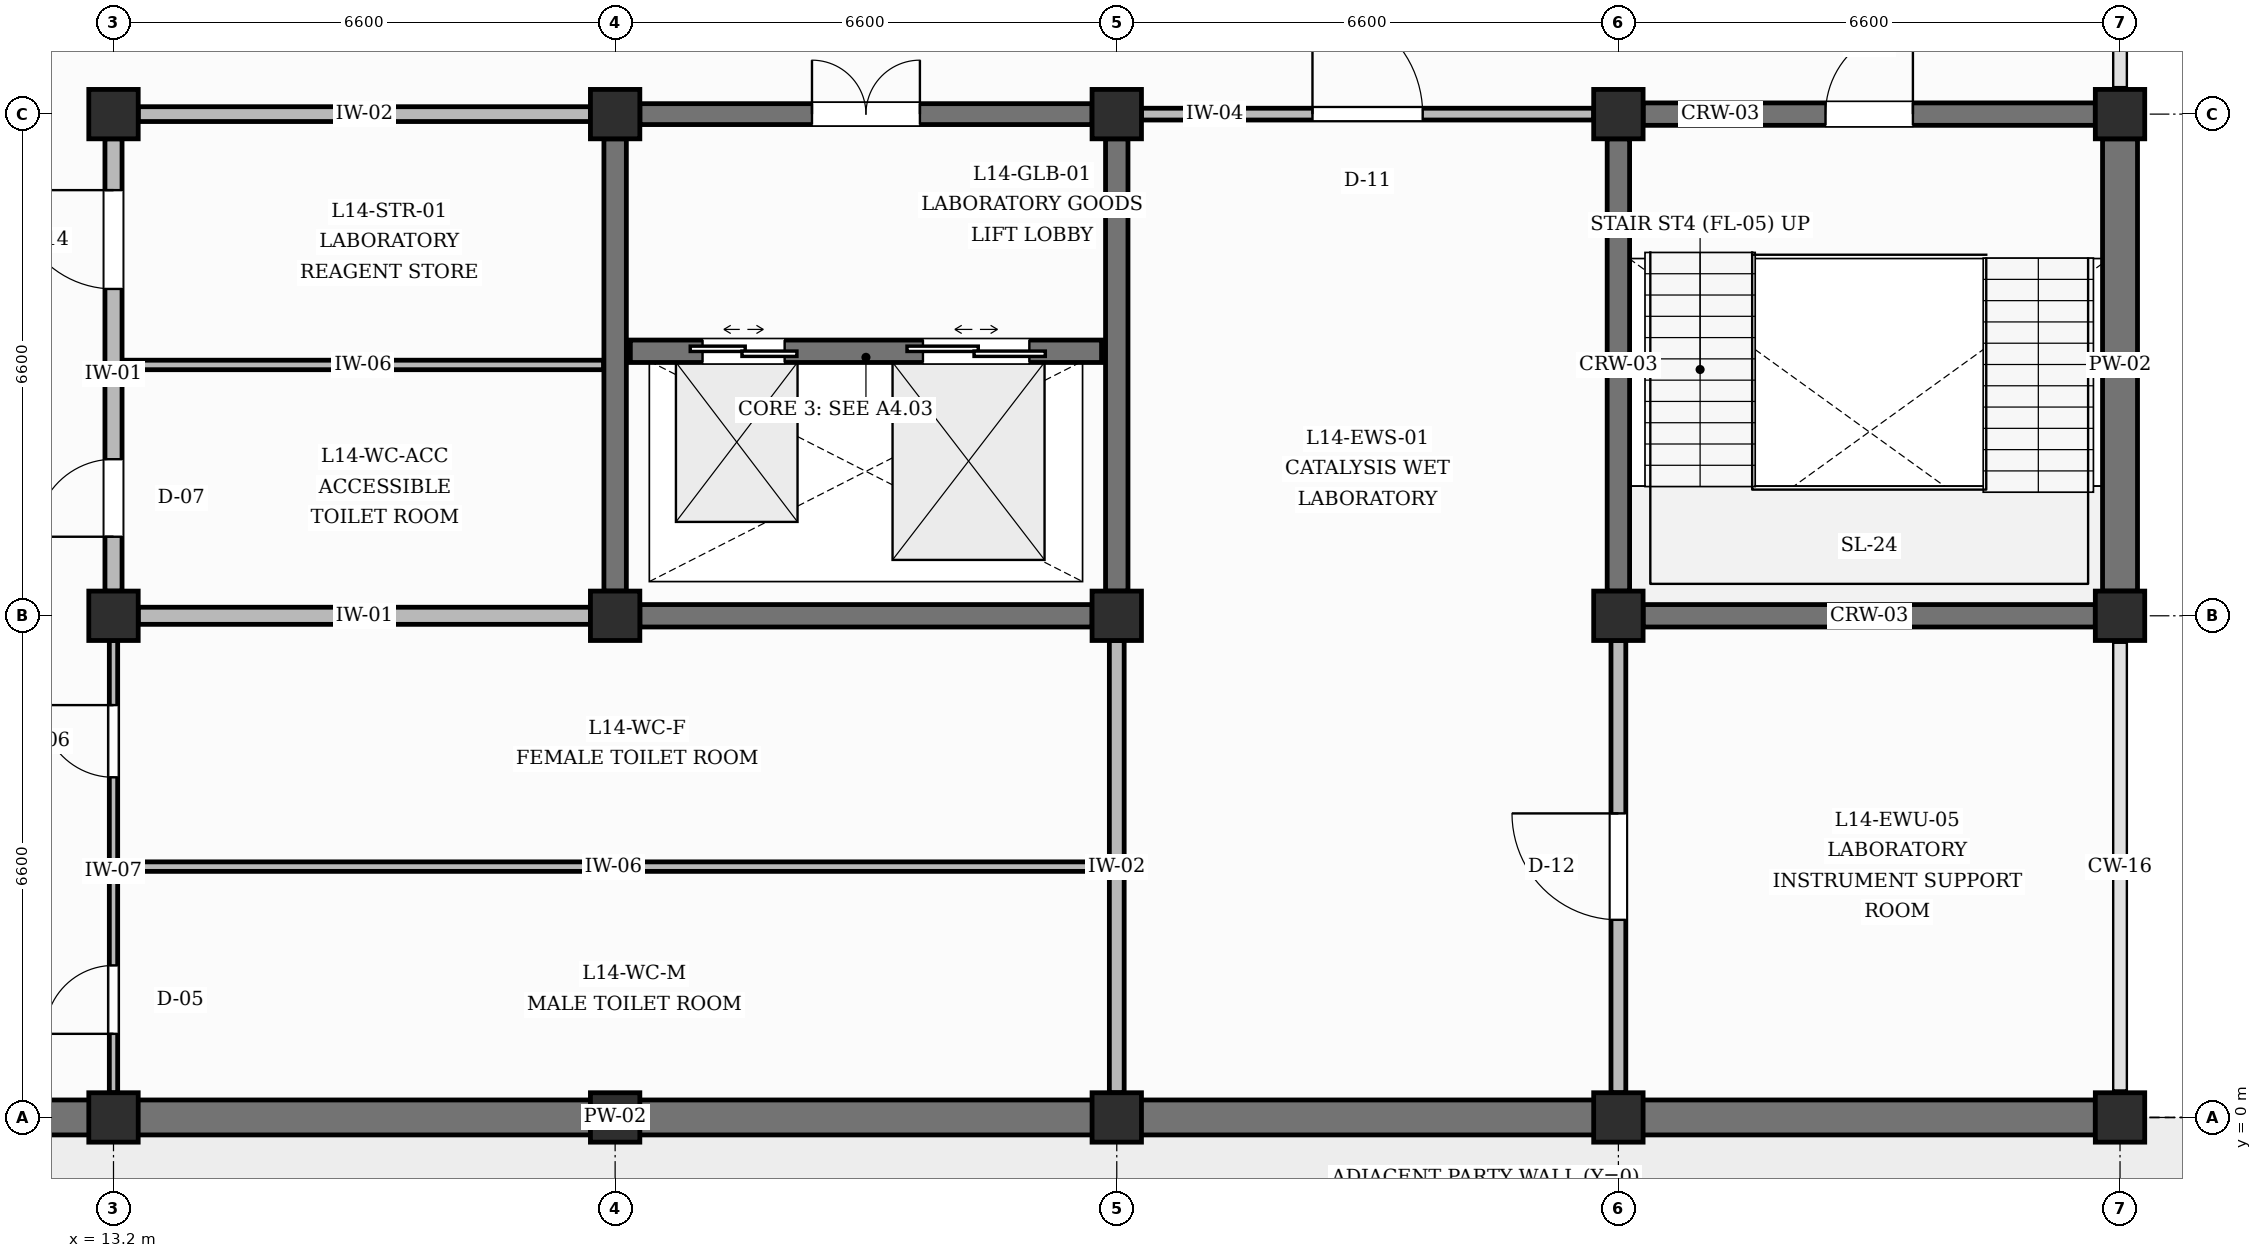
"""IFC4 building model, lengths in metres.
Left out: names, types, materials, properties, quantities, classifications, styles, units other than length and angle.
Written with IfcOpenShell. Run it as: python <this file> out.ifc"""

import sys

from ifc_helpers import new_model, si_unit, direction, frame, frame_2d, origin, origin_2d, place, context, subcontext, project, spatial, rectangle, extrude, element, fill, save


model = new_model("IFC4")
c1 = context("Model", 3, precision=1e-05, world=origin(), true_north=direction((0.0, 1.0)))
c2 = subcontext(c1, "Body", "Model", "MODEL_VIEW")
j1 = project(units=[si_unit("LENGTHUNIT", "METRE"), si_unit("PLANEANGLEUNIT", "RADIAN")], contexts=[c1])
p1 = place(None, origin())
s1 = spatial("IfcSite", under=j1, at=p1, CompositionType="ELEMENT")
p2 = place(p1, origin())
s2 = spatial("IfcBuilding", under=s1, at=p2, CompositionType="ELEMENT")
p3 = place(p2, frame((0.0, 0.0, 60.6)))
s3 = spatial("IfcBuildingStorey", under=s2, at=p3, CompositionType="ELEMENT", Elevation=60.6)
for number, where, z_axis, x_axis in (
    (1, (13.2, 0.0, 0.0), (0.0, 0.0, 1.0), (1.0, 0.0, 0.0)),
    (2, (13.2, 6.6, 0.0), (0.0, 0.0, 1.0), (1.0, 0.0, 0.0)),
    (3, (13.2, 13.2, 0.0), (0.0, 0.0, 1.0), (1.0, 0.0, 0.0)),
    (4, (19.8, 0.0, 0.0), (0.0, 0.0, 1.0), (1.0, 0.0, 0.0)),
    (5, (19.8, 6.6, 0.0), (0.0, 0.0, 1.0), (1.0, 0.0, 0.0)),
    (6, (19.8, 13.2, 0.0), (0.0, 0.0, 1.0), (1.0, 0.0, 0.0)),
    (7, (26.4, 0.0, 0.0), (0.0, 0.0, 1.0), (1.0, 0.0, 0.0)),
    (8, (26.4, 6.6, 0.0), (0.0, 0.0, 1.0), (1.0, 0.0, 0.0)),
    (9, (26.4, 13.2, 0.0), (0.0, 0.0, 1.0), (1.0, 0.0, 0.0)),
    (10, (33.0, 0.0, 0.0), (0.0, 0.0, 1.0), (1.0, 0.0, 0.0)),
    (11, (33.0, 6.6, 0.0), (0.0, 0.0, 1.0), (1.0, 0.0, 0.0)),
    (12, (33.0, 13.2, 0.0), (0.0, 0.0, 1.0), (1.0, 0.0, 0.0)),
    (13, (39.6, 0.0, 0.0), (0.0, 0.0, 1.0), (1.0, 0.0, 0.0)),
    (14, (39.6, 6.6, 0.0), (0.0, 0.0, 1.0), (1.0, 0.0, 0.0)),
    (15, (39.6, 13.2, 0.0), (0.0, 0.0, 1.0), (1.0, 0.0, 0.0)),
):
    element("IfcColumn", number, at=place(p3, frame(where, z_axis=z_axis, x_axis=x_axis)), inside=s3, PredefinedType="COLUMN", context=c2, shape_type="SweptSolid", body=[
        extrude(rectangle(XDim=0.65, YDim=0.65, at=origin_2d()), origin(), (0.0, 0.0, 1.0), 4.2),
    ])
p4 = place(p3, frame((6.925, 0.0, 0.0), z_axis=(0.0, 0.0, 1.0), x_axis=(1.0, 0.0, 0.0)))
e16 = element("IfcWall", 16, at=p4, inside=s3, PredefinedType="SOLIDWALL", context=c2, shape_type="SweptSolid", body=[
    extrude(rectangle(XDim=5.95, YDim=0.46, at=frame_2d((2.975, 0.0))), origin(), (0.0, 0.0, 1.0), 3.31),
])
p5 = place(p3, frame((13.525, 0.0, 0.0), z_axis=(0.0, 0.0, 1.0), x_axis=(1.0, 0.0, 0.0)))
e17 = element("IfcWall", 17, at=p5, inside=s3, PredefinedType="SOLIDWALL", context=c2, shape_type="SweptSolid", body=[
    extrude(rectangle(XDim=5.95, YDim=0.46, at=frame_2d((2.975, 0.0))), origin(), (0.0, 0.0, 1.0), 3.31),
])
for number, where, z_axis, x_axis in (
    (18, (20.125, 0.0, 0.0), (0.0, 0.0, 1.0), (1.0, 0.0, 0.0)),
    (19, (26.725, 0.0, 0.0), (0.0, 0.0, 1.0), (1.0, 0.0, 0.0)),
    (20, (33.325, 0.0, 0.0), (0.0, 0.0, 1.0), (1.0, 0.0, 0.0)),
    (21, (39.6, 6.925, 0.0), (0.0, 0.0, 1.0), (0.0, 1.0, 0.0)),
):
    element("IfcWall", number, at=place(p3, frame(where, z_axis=z_axis, x_axis=x_axis)), inside=s3, PredefinedType="SOLIDWALL", context=c2, shape_type="SweptSolid", body=[
        extrude(rectangle(XDim=5.95, YDim=0.46, at=frame_2d((2.975, 0.0))), origin(), (0.0, 0.0, 1.0), 3.31),
    ])
p6 = place(p3, frame((33.325, 6.6, 0.0), z_axis=(0.0, 0.0, 1.0), x_axis=(1.0, 0.0, 0.0)))
e22 = element("IfcWall", 22, at=p6, inside=s3, PredefinedType="SHEAR", context=c2, shape_type="SweptSolid", body=[
    extrude(rectangle(XDim=5.95, YDim=0.295, at=frame_2d((2.975, 0.0))), origin(), (0.0, 0.0, 1.0), 3.31),
])
p7 = place(p3, frame((33.325, 13.2, 0.0), z_axis=(0.0, 0.0, 1.0), x_axis=(1.0, 0.0, 0.0)))
e23 = element("IfcWall", 23, at=p7, inside=s3, PredefinedType="SHEAR", context=c2, shape_type="SweptSolid", body=[
    extrude(rectangle(XDim=5.95, YDim=0.295, at=frame_2d((2.975, 0.0))), origin(), (0.0, 0.0, 1.0), 3.31),
])
p8 = place(p7, frame((2.4, 0.0, 0.0)))
e24 = element("IfcOpeningElement", 24, at=p8, cuts=e23, PredefinedType="OPENING", context=c2, shape_type="SweptSolid", body=[
    extrude(rectangle(XDim=1.15, YDim=2.2, at=frame_2d((0.575, 1.1))), frame((0.0, 0.157, 0.0), z_axis=(0.0, -1.0, 0.0), x_axis=(1.0, 0.0, 0.0)), (0.0, 0.0, 1.0), 0.315),
])
for number, where, z_axis, x_axis in (
    (25, (33.0, 6.925, 0.0), (0.0, 0.0, 1.0), (0.0, 1.0, 0.0)),
    (26, (20.125, 6.6, 0.0), (0.0, 0.0, 1.0), (1.0, 0.0, 0.0)),
    (27, (19.8, 6.925, 0.0), (0.0, 0.0, 1.0), (0.0, 1.0, 0.0)),
    (28, (26.4, 6.925, 0.0), (0.0, 0.0, 1.0), (0.0, 1.0, 0.0)),
):
    element("IfcWall", number, at=place(p3, frame(where, z_axis=z_axis, x_axis=x_axis)), inside=s3, PredefinedType="SHEAR", context=c2, shape_type="SweptSolid", body=[
        extrude(rectangle(XDim=5.95, YDim=0.295, at=frame_2d((2.975, 0.0))), origin(), (0.0, 0.0, 1.0), 3.31),
    ])
p9 = place(p3, frame((20.125, 13.2, 0.0), z_axis=(0.0, 0.0, 1.0), x_axis=(1.0, 0.0, 0.0)))
e29 = element("IfcWall", 29, at=p9, inside=s3, PredefinedType="SHEAR", context=c2, shape_type="SweptSolid", body=[
    extrude(rectangle(XDim=5.95, YDim=0.275, at=frame_2d((2.975, 0.0))), origin(), (0.0, 0.0, 1.0), 3.31),
])
p10 = place(p9, frame((2.265, 0.0, 0.0)))
e30 = element("IfcOpeningElement", 30, at=p10, cuts=e29, PredefinedType="OPENING", context=c2, shape_type="SweptSolid", body=[
    extrude(rectangle(XDim=1.42, YDim=2.2, at=frame_2d((0.71, 1.1))), frame((0.0, 0.147, 0.0), z_axis=(0.0, -1.0, 0.0), x_axis=(1.0, 0.0, 0.0)), (0.0, 0.0, 1.0), 0.295),
])
p11 = place(p3, frame((20.0, 10.08, 0.0), z_axis=(0.0, 0.0, 1.0), x_axis=(1.0, 0.0, 0.0)))
e31 = element("IfcWall", 31, at=p11, inside=s3, PredefinedType="SHEAR", context=c2, shape_type="SweptSolid", body=[
    extrude(rectangle(XDim=6.2, YDim=0.295, at=frame_2d((3.1, 0.0))), origin(), (0.0, 0.0, 1.0), 3.91),
])
p12 = place(p11, frame((0.95, 0.0, 0.0)))
e32 = element("IfcOpeningElement", 32, at=p12, cuts=e31, PredefinedType="OPENING", context=c2, shape_type="SweptSolid", body=[
    extrude(rectangle(XDim=1.08, YDim=2.15, at=frame_2d((0.54, 1.075))), frame((0.0, 0.157, 0.0), z_axis=(0.0, -1.0, 0.0), x_axis=(1.0, 0.0, 0.0)), (0.0, 0.0, 1.0), 0.315),
])
p13 = place(p11, frame((3.85, 0.0, 0.0)))
e33 = element("IfcOpeningElement", 33, at=p13, cuts=e31, PredefinedType="OPENING", context=c2, shape_type="SweptSolid", body=[
    extrude(rectangle(XDim=1.4, YDim=2.35, at=frame_2d((0.7, 1.175))), frame((0.0, 0.157, 0.0), z_axis=(0.0, -1.0, 0.0), x_axis=(1.0, 0.0, 0.0)), (0.0, 0.0, 1.0), 0.315),
])
p14 = place(p3, frame((13.2, 0.325, 0.0), z_axis=(0.0, 0.0, 1.0), x_axis=(0.0, 1.0, 0.0)))
e34 = element("IfcWall", 34, at=p14, inside=s3, PredefinedType="PARTITIONING", context=c2, shape_type="SweptSolid", body=[
    extrude(rectangle(XDim=5.95, YDim=0.11, at=frame_2d((2.975, 0.0))), origin(), (0.0, 0.0, 1.0), 3.31),
])
p15 = place(p14, frame((0.775, 0.0, 0.0)))
e35 = element("IfcOpeningElement", 35, at=p15, cuts=e34, PredefinedType="OPENING", context=c2, shape_type="SweptSolid", body=[
    extrude(rectangle(XDim=0.9, YDim=2.1, at=frame_2d((0.45, 1.05))), frame((0.0, 0.065, 0.0), z_axis=(0.0, -1.0, 0.0), x_axis=(1.0, 0.0, 0.0)), (0.0, 0.0, 1.0), 0.13),
])
p16 = place(p14, frame((4.15, 0.0, 0.0)))
e36 = element("IfcOpeningElement", 36, at=p16, cuts=e34, PredefinedType="OPENING", context=c2, shape_type="SweptSolid", body=[
    extrude(rectangle(XDim=0.95, YDim=2.1, at=frame_2d((0.475, 1.05))), frame((0.0, 0.065, 0.0), z_axis=(0.0, -1.0, 0.0), x_axis=(1.0, 0.0, 0.0)), (0.0, 0.0, 1.0), 0.13),
])
p17 = place(p3, frame((26.4, 0.325, 0.0), z_axis=(0.0, 0.0, 1.0), x_axis=(0.0, 1.0, 0.0)))
e37 = element("IfcWall", 37, at=p17, inside=s3, PredefinedType="PARTITIONING", context=c2, shape_type="SweptSolid", body=[
    extrude(rectangle(XDim=5.95, YDim=0.195, at=frame_2d((2.975, 0.0))), origin(), (0.0, 0.0, 1.0), 3.31),
])
p18 = place(p3, frame((13.525, 6.6, 0.0), z_axis=(0.0, 0.0, 1.0), x_axis=(1.0, 0.0, 0.0)))
e38 = element("IfcWall", 38, at=p18, inside=s3, PredefinedType="PARTITIONING", context=c2, shape_type="SweptSolid", body=[
    extrude(rectangle(XDim=5.95, YDim=0.225, at=frame_2d((2.975, 0.0))), origin(), (0.0, 0.0, 1.0), 3.31),
])
p19 = place(p3, frame((13.2, 6.925, 0.0), z_axis=(0.0, 0.0, 1.0), x_axis=(0.0, 1.0, 0.0)))
e39 = element("IfcWall", 39, at=p19, inside=s3, PredefinedType="PARTITIONING", context=c2, shape_type="SweptSolid", body=[
    extrude(rectangle(XDim=5.95, YDim=0.225, at=frame_2d((2.975, 0.0))), origin(), (0.0, 0.0, 1.0), 3.31),
])
p20 = place(p19, frame((0.715, 0.0, 0.0)))
e40 = element("IfcOpeningElement", 40, at=p20, cuts=e39, PredefinedType="OPENING", context=c2, shape_type="SweptSolid", body=[
    extrude(rectangle(XDim=1.02, YDim=2.15, at=frame_2d((0.51, 1.075))), frame((0.0, 0.123, 0.0), z_axis=(0.0, -1.0, 0.0), x_axis=(1.0, 0.0, 0.0)), (0.0, 0.0, 1.0), 0.245),
])
p21 = place(p19, frame((3.975, 0.0, 0.0)))
e41 = element("IfcOpeningElement", 41, at=p21, cuts=e39, PredefinedType="OPENING", context=c2, shape_type="SweptSolid", body=[
    extrude(rectangle(XDim=1.3, YDim=2.3, at=frame_2d((0.65, 1.15))), frame((0.0, 0.123, 0.0), z_axis=(0.0, -1.0, 0.0), x_axis=(1.0, 0.0, 0.0)), (0.0, 0.0, 1.0), 0.245),
])
p22 = place(p3, frame((13.525, 13.2, 0.0), z_axis=(0.0, 0.0, 1.0), x_axis=(1.0, 0.0, 0.0)))
e42 = element("IfcWall", 42, at=p22, inside=s3, PredefinedType="PARTITIONING", context=c2, shape_type="SweptSolid", body=[
    extrude(rectangle(XDim=5.95, YDim=0.195, at=frame_2d((2.975, 0.0))), origin(), (0.0, 0.0, 1.0), 3.31),
])
p23 = place(p3, frame((33.0, 0.325, 0.0), z_axis=(0.0, 0.0, 1.0), x_axis=(0.0, 1.0, 0.0)))
e43 = element("IfcWall", 43, at=p23, inside=s3, PredefinedType="PARTITIONING", context=c2, shape_type="SweptSolid", body=[
    extrude(rectangle(XDim=5.95, YDim=0.195, at=frame_2d((2.975, 0.0))), origin(), (0.0, 0.0, 1.0), 3.31),
])
p24 = place(p23, frame((2.275, 0.0, 0.0)))
e44 = element("IfcOpeningElement", 44, at=p24, cuts=e43, PredefinedType="OPENING", context=c2, shape_type="SweptSolid", body=[
    extrude(rectangle(XDim=1.4, YDim=2.25, at=frame_2d((0.7, 1.125))), frame((0.0, 0.107, 0.0), z_axis=(0.0, -1.0, 0.0), x_axis=(1.0, 0.0, 0.0)), (0.0, 0.0, 1.0), 0.215),
])
p25 = place(p3, frame((26.725, 13.2, 0.0), z_axis=(0.0, 0.0, 1.0), x_axis=(1.0, 0.0, 0.0)))
e45 = element("IfcWall", 45, at=p25, inside=s3, PredefinedType="PARTITIONING", context=c2, shape_type="SweptSolid", body=[
    extrude(rectangle(XDim=5.95, YDim=0.155, at=frame_2d((2.975, 0.0))), origin(), (0.0, 0.0, 1.0), 3.31),
])
p26 = place(p25, frame((2.25, 0.0, 0.0)))
e46 = element("IfcOpeningElement", 46, at=p26, cuts=e45, PredefinedType="OPENING", context=c2, shape_type="SweptSolid", body=[
    extrude(rectangle(XDim=1.45, YDim=2.25, at=frame_2d((0.725, 1.125))), frame((0.0, 0.087, 0.0), z_axis=(0.0, -1.0, 0.0), x_axis=(1.0, 0.0, 0.0)), (0.0, 0.0, 1.0), 0.175),
])
p27 = place(p3, frame((13.26, 3.3, 0.0), z_axis=(0.0, 0.0, 1.0), x_axis=(1.0, 0.0, 0.0)))
e47 = element("IfcWall", 47, at=p27, inside=s3, PredefinedType="PARTITIONING", context=c2, shape_type="SweptSolid", body=[
    extrude(rectangle(XDim=13.038, YDim=0.125, at=frame_2d((6.519, 0.0))), origin(), (0.0, 0.0, 1.0), 3.91),
])
p28 = place(p3, frame((13.317, 9.9, 0.0), z_axis=(0.0, 0.0, 1.0), x_axis=(1.0, 0.0, 0.0)))
e48 = element("IfcWall", 48, at=p28, inside=s3, PredefinedType="PARTITIONING", context=c2, shape_type="SweptSolid", body=[
    extrude(rectangle(XDim=6.33, YDim=0.125, at=frame_2d((3.165, 0.0))), origin(), (0.0, 0.0, 1.0), 3.91),
])
p29 = place(p8, origin())
e49 = element("IfcDoor", 49, at=p29, inside=s3, OperationType="SINGLE_SWING_RIGHT", PredefinedType="DOOR", context=c2, shape_type="SweptSolid", body=[
    extrude(rectangle(XDim=1.15, YDim=2.2, at=frame_2d((0.575, 1.1))), frame((0.0, 0.025, 0.0), z_axis=(0.0, -1.0, 0.0), x_axis=(1.0, 0.0, 0.0)), (0.0, 0.0, 1.0), 0.05),
])
fill(e24, e49)
p30 = place(p12, origin())
e50 = element("IfcDoor", 50, at=p30, inside=s3, OperationType="DOUBLE_DOOR_SLIDING", PredefinedType="USERDEFINED", context=c2, shape_type="SweptSolid", body=[
    extrude(rectangle(XDim=1.08, YDim=2.15, at=frame_2d((0.54, 1.075))), frame((0.0, 0.025, 0.0), z_axis=(0.0, -1.0, 0.0), x_axis=(1.0, 0.0, 0.0)), (0.0, 0.0, 1.0), 0.05),
])
fill(e32, e50)
p31 = place(p13, origin())
e51 = element("IfcDoor", 51, at=p31, inside=s3, OperationType="DOUBLE_DOOR_SLIDING", PredefinedType="USERDEFINED", context=c2, shape_type="SweptSolid", body=[
    extrude(rectangle(XDim=1.4, YDim=2.35, at=frame_2d((0.7, 1.175))), frame((0.0, 0.025, 0.0), z_axis=(0.0, -1.0, 0.0), x_axis=(1.0, 0.0, 0.0)), (0.0, 0.0, 1.0), 0.05),
])
fill(e33, e51)
p32 = place(p10, origin())
e52 = element("IfcDoor", 52, at=p32, inside=s3, OperationType="DOUBLE_DOOR_SINGLE_SWING", PredefinedType="DOOR", context=c2, shape_type="SweptSolid", body=[
    extrude(rectangle(XDim=1.42, YDim=2.2, at=frame_2d((0.71, 1.1))), frame((0.0, 0.025, 0.0), z_axis=(0.0, -1.0, 0.0), x_axis=(1.0, 0.0, 0.0)), (0.0, 0.0, 1.0), 0.05),
])
fill(e30, e52)
p33 = place(p15, origin())
e53 = element("IfcDoor", 53, at=p33, inside=s3, OperationType="SINGLE_SWING_LEFT", PredefinedType="DOOR", context=c2, shape_type="SweptSolid", body=[
    extrude(rectangle(XDim=0.9, YDim=2.1, at=frame_2d((0.45, 1.05))), frame((0.0, 0.025, 0.0), z_axis=(0.0, -1.0, 0.0), x_axis=(1.0, 0.0, 0.0)), (0.0, 0.0, 1.0), 0.05),
])
fill(e35, e53)
p34 = place(p16, origin())
e54 = element("IfcDoor", 54, at=p34, inside=s3, OperationType="SINGLE_SWING_RIGHT", PredefinedType="DOOR", context=c2, shape_type="SweptSolid", body=[
    extrude(rectangle(XDim=0.95, YDim=2.1, at=frame_2d((0.475, 1.05))), frame((0.0, 0.025, 0.0), z_axis=(0.0, -1.0, 0.0), x_axis=(1.0, 0.0, 0.0)), (0.0, 0.0, 1.0), 0.05),
])
fill(e36, e54)
p35 = place(p20, origin())
e55 = element("IfcDoor", 55, at=p35, inside=s3, OperationType="SINGLE_SWING_LEFT", PredefinedType="DOOR", context=c2, shape_type="SweptSolid", body=[
    extrude(rectangle(XDim=1.02, YDim=2.15, at=frame_2d((0.51, 1.075))), frame((0.0, 0.025, 0.0), z_axis=(0.0, -1.0, 0.0), x_axis=(1.0, 0.0, 0.0)), (0.0, 0.0, 1.0), 0.05),
])
fill(e40, e55)
p36 = place(p21, origin())
e56 = element("IfcDoor", 56, at=p36, inside=s3, OperationType="SINGLE_SWING_RIGHT", PredefinedType="DOOR", context=c2, shape_type="SweptSolid", body=[
    extrude(rectangle(XDim=1.3, YDim=2.3, at=frame_2d((0.65, 1.15))), frame((0.0, 0.025, 0.0), z_axis=(0.0, -1.0, 0.0), x_axis=(1.0, 0.0, 0.0)), (0.0, 0.0, 1.0), 0.05),
])
fill(e41, e56)
p37 = place(p26, origin())
e57 = element("IfcDoor", 57, at=p37, inside=s3, OperationType="SINGLE_SWING_LEFT", PredefinedType="DOOR", context=c2, shape_type="SweptSolid", body=[
    extrude(rectangle(XDim=1.45, YDim=2.25, at=frame_2d((0.725, 1.125))), frame((0.0, 0.025, 0.0), z_axis=(0.0, -1.0, 0.0), x_axis=(1.0, 0.0, 0.0)), (0.0, 0.0, 1.0), 0.05),
])
fill(e46, e57)
p38 = place(p24, origin())
e58 = element("IfcDoor", 58, at=p38, inside=s3, OperationType="SINGLE_SWING_RIGHT", PredefinedType="DOOR", context=c2, shape_type="SweptSolid", body=[
    extrude(rectangle(XDim=1.4, YDim=2.25, at=frame_2d((0.7, 1.125))), frame((0.0, 0.025, 0.0), z_axis=(0.0, -1.0, 0.0), x_axis=(1.0, 0.0, 0.0)), (0.0, 0.0, 1.0), 0.05),
])
fill(e44, e58)
save(model, sys.argv[1])
